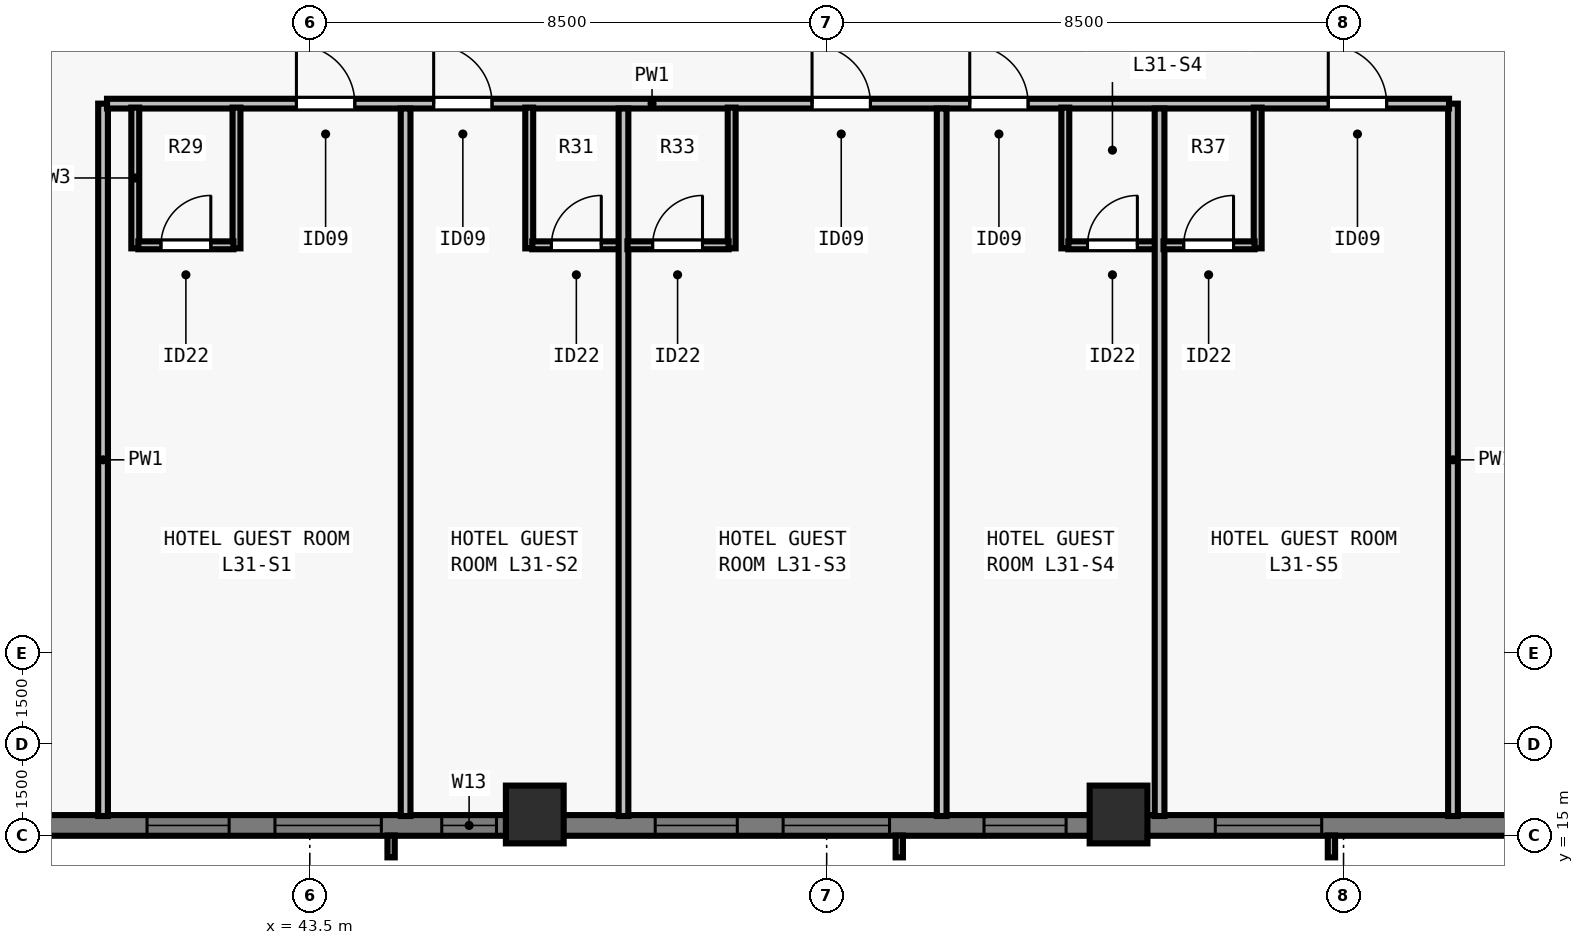
"""IFC4 building model, lengths in metres.
Left out: names, types, materials, properties, quantities, classifications, styles, units other than length and angle.
Written with IfcOpenShell. Run it as: python <this file> out.ifc"""

import sys

from ifc_helpers import new_model, si_unit, direction, frame, frame_2d, origin, origin_2d, place, context, subcontext, project, spatial, rectangle, extrude, element, fill, save


model = new_model("IFC4")
c1 = context("Model", 3, precision=1e-05, world=origin(), true_north=direction((0.0, 1.0)))
c2 = subcontext(c1, "Body", "Model", "MODEL_VIEW")
j1 = project(units=[si_unit("LENGTHUNIT", "METRE"), si_unit("PLANEANGLEUNIT", "RADIAN")], contexts=[c1])
p1 = place(None, origin())
s1 = spatial("IfcSite", under=j1, at=p1, CompositionType="ELEMENT")
p2 = place(p1, origin())
s2 = spatial("IfcBuilding", under=s1, at=p2, CompositionType="ELEMENT")
p3 = place(p2, frame((0.0, 0.0, 116.5)))
s3 = spatial("IfcBuildingStorey", under=s2, at=p3, CompositionType="ELEMENT", Elevation=116.5)
for number, where, z_axis, x_axis in (
    (1, (47.2, 15.35, 0.0), (0.0, 0.0, 1.0), (1.0, 0.0, 0.0)),
    (2, (56.8, 15.35, 0.0), (0.0, 0.0, 1.0), (1.0, 0.0, 0.0)),
):
    element("IfcColumn", number, at=place(p3, frame(where, z_axis=z_axis, x_axis=x_axis)), inside=s3, PredefinedType="COLUMN", context=c2, shape_type="SweptSolid", body=[
        extrude(rectangle(XDim=0.95, YDim=0.95, at=origin_2d()), origin(), (0.0, 0.0, 1.0), 3.5),
    ])
p4 = place(p3, frame((72.0, 15.17, 0.0), z_axis=(0.0, 0.0, 1.0), x_axis=(-1.0, 0.0, 0.0)))
e3 = element("IfcWall", 3, at=p4, inside=s3, PredefinedType="SOLIDWALL", context=c2, shape_type="SweptSolid", body=[
    extrude(rectangle(XDim=39.682, YDim=0.34, at=frame_2d((19.841, 0.0))), origin(), (0.0, 0.0, 1.0), 3.28),
])
p5 = place(p4, frame((11.859, 0.0, 0.8)))
e4 = element("IfcOpeningElement", 4, at=p5, cuts=e3, PredefinedType="OPENING", context=c2, shape_type="SweptSolid", body=[
    extrude(rectangle(XDim=1.75, YDim=1.66, at=frame_2d((0.875, 0.83))), frame((0.0, 0.18, 0.0), z_axis=(0.0, -1.0, 0.0), x_axis=(1.0, 0.0, 0.0)), (0.0, 0.0, 1.0), 0.36),
])
p6 = place(p4, frame((16.062, 0.0, 0.8)))
e5 = element("IfcOpeningElement", 5, at=p6, cuts=e3, PredefinedType="OPENING", context=c2, shape_type="SweptSolid", body=[
    extrude(rectangle(XDim=1.35, YDim=1.66, at=frame_2d((0.675, 0.83))), frame((0.0, 0.18, 0.0), z_axis=(0.0, -1.0, 0.0), x_axis=(1.0, 0.0, 0.0)), (0.0, 0.0, 1.0), 0.36),
])
p7 = place(p4, frame((18.966, 0.0, 0.8)))
e6 = element("IfcOpeningElement", 6, at=p7, cuts=e3, PredefinedType="OPENING", context=c2, shape_type="SweptSolid", body=[
    extrude(rectangle(XDim=1.75, YDim=1.66, at=frame_2d((0.875, 0.83))), frame((0.0, 0.18, 0.0), z_axis=(0.0, -1.0, 0.0), x_axis=(1.0, 0.0, 0.0)), (0.0, 0.0, 1.0), 0.36),
])
p8 = place(p4, frame((21.469, 0.0, 0.8)))
e7 = element("IfcOpeningElement", 7, at=p8, cuts=e3, PredefinedType="OPENING", context=c2, shape_type="SweptSolid", body=[
    extrude(rectangle(XDim=1.35, YDim=1.66, at=frame_2d((0.675, 0.83))), frame((0.0, 0.18, 0.0), z_axis=(0.0, -1.0, 0.0), x_axis=(1.0, 0.0, 0.0)), (0.0, 0.0, 1.0), 0.36),
])
p9 = place(p4, frame((27.323, 0.0, 0.8)))
e8 = element("IfcOpeningElement", 8, at=p9, cuts=e3, PredefinedType="OPENING", context=c2, shape_type="SweptSolid", body=[
    extrude(rectangle(XDim=1.75, YDim=1.66, at=frame_2d((0.875, 0.83))), frame((0.0, 0.18, 0.0), z_axis=(0.0, -1.0, 0.0), x_axis=(1.0, 0.0, 0.0)), (0.0, 0.0, 1.0), 0.36),
])
p10 = place(p4, frame((29.827, 0.0, 0.8)))
e9 = element("IfcOpeningElement", 9, at=p10, cuts=e3, PredefinedType="OPENING", context=c2, shape_type="SweptSolid", body=[
    extrude(rectangle(XDim=1.35, YDim=1.66, at=frame_2d((0.675, 0.83))), frame((0.0, 0.18, 0.0), z_axis=(0.0, -1.0, 0.0), x_axis=(1.0, 0.0, 0.0)), (0.0, 0.0, 1.0), 0.36),
])
p11 = place(p4, frame((25.43, 0.0, 0.8)))
e10 = element("IfcOpeningElement", 10, at=p11, cuts=e3, PredefinedType="OPENING", context=c2, shape_type="SweptSolid", body=[
    extrude(rectangle(XDim=0.9, YDim=1.66, at=frame_2d((0.45, 0.83))), frame((0.0, 0.18, 0.0), z_axis=(0.0, -1.0, 0.0), x_axis=(1.0, 0.0, 0.0)), (0.0, 0.0, 1.0), 0.36),
])
p12 = place(p4, frame((34.39, 0.0, 0.8)))
e11 = element("IfcOpeningElement", 11, at=p12, cuts=e3, PredefinedType="OPENING", context=c2, shape_type="SweptSolid", body=[
    extrude(rectangle(XDim=0.9, YDim=1.66, at=frame_2d((0.45, 0.83))), frame((0.0, 0.18, 0.0), z_axis=(0.0, -1.0, 0.0), x_axis=(1.0, 0.0, 0.0)), (0.0, 0.0, 1.0), 0.36),
])
p13 = place(p3, frame((40.1, 15.325, 0.0), z_axis=(0.0, 0.0, 1.0), x_axis=(0.0, 1.0, 0.0)))
e12 = element("IfcWall", 12, at=p13, inside=s3, PredefinedType="PARTITIONING", context=c2, shape_type="SweptSolid", body=[
    extrude(rectangle(XDim=11.715, YDim=0.16, at=frame_2d((5.857, 0.0))), origin(), (0.0, 0.0, 1.0), 2.555),
])
p14 = place(p3, frame((62.3, 15.325, 0.0), z_axis=(0.0, 0.0, 1.0), x_axis=(0.0, 1.0, 0.0)))
e13 = element("IfcWall", 13, at=p14, inside=s3, PredefinedType="PARTITIONING", context=c2, shape_type="SweptSolid", body=[
    extrude(rectangle(XDim=11.715, YDim=0.16, at=frame_2d((5.857, 0.0))), origin(), (0.0, 0.0, 1.0), 3.28),
])
p15 = place(p3, frame((40.165, 27.04, 0.0), z_axis=(0.0, 0.0, 1.0), x_axis=(1.0, 0.0, 0.0)))
e14 = element("IfcWall", 14, at=p15, inside=s3, PredefinedType="PARTITIONING", context=c2, shape_type="SweptSolid", body=[
    extrude(rectangle(XDim=22.07, YDim=0.16, at=frame_2d((11.035, 0.0))), origin(), (0.0, 0.0, 1.0), 3.28),
])
p16 = place(p15, frame((3.115, 0.0, 0.0)))
e15 = element("IfcOpeningElement", 15, at=p16, cuts=e14, PredefinedType="OPENING", context=c2, shape_type="SweptSolid", body=[
    extrude(rectangle(XDim=0.96, YDim=2.15, at=frame_2d((0.48, 1.075))), frame((0.0, 0.09, 0.0), z_axis=(0.0, -1.0, 0.0), x_axis=(1.0, 0.0, 0.0)), (0.0, 0.0, 1.0), 0.18),
])
p17 = place(p15, frame((5.372, 0.0, 0.0)))
e16 = element("IfcOpeningElement", 16, at=p17, cuts=e14, PredefinedType="OPENING", context=c2, shape_type="SweptSolid", body=[
    extrude(rectangle(XDim=0.96, YDim=2.15, at=frame_2d((0.48, 1.075))), frame((0.0, 0.09, 0.0), z_axis=(0.0, -1.0, 0.0), x_axis=(1.0, 0.0, 0.0)), (0.0, 0.0, 1.0), 0.18),
])
p18 = place(p15, frame((11.594, 0.0, 0.0)))
e17 = element("IfcOpeningElement", 17, at=p18, cuts=e14, PredefinedType="OPENING", context=c2, shape_type="SweptSolid", body=[
    extrude(rectangle(XDim=0.96, YDim=2.15, at=frame_2d((0.48, 1.075))), frame((0.0, 0.09, 0.0), z_axis=(0.0, -1.0, 0.0), x_axis=(1.0, 0.0, 0.0)), (0.0, 0.0, 1.0), 0.18),
])
p19 = place(p15, frame((14.188, 0.0, 0.0)))
e18 = element("IfcOpeningElement", 18, at=p19, cuts=e14, PredefinedType="OPENING", context=c2, shape_type="SweptSolid", body=[
    extrude(rectangle(XDim=0.96, YDim=2.15, at=frame_2d((0.48, 1.075))), frame((0.0, 0.09, 0.0), z_axis=(0.0, -1.0, 0.0), x_axis=(1.0, 0.0, 0.0)), (0.0, 0.0, 1.0), 0.18),
])
p20 = place(p15, frame((20.084, 0.0, 0.0)))
e19 = element("IfcOpeningElement", 19, at=p20, cuts=e14, PredefinedType="OPENING", context=c2, shape_type="SweptSolid", body=[
    extrude(rectangle(XDim=0.96, YDim=2.15, at=frame_2d((0.48, 1.075))), frame((0.0, 0.09, 0.0), z_axis=(0.0, -1.0, 0.0), x_axis=(1.0, 0.0, 0.0)), (0.0, 0.0, 1.0), 0.18),
])
p21 = place(p3, frame((40.63, 24.66, 0.0), z_axis=(0.0, 0.0, 1.0), x_axis=(0.0, 1.0, 0.0)))
e20 = element("IfcWall", 20, at=p21, inside=s3, PredefinedType="PLUMBINGWALL", context=c2, shape_type="SweptSolid", body=[
    extrude(rectangle(XDim=2.315, YDim=0.13, at=frame_2d((1.158, 0.0))), origin(), (0.0, 0.0, 1.0), 2.555),
])
p22 = place(p3, frame((42.294, 24.66, 0.0), z_axis=(0.0, 0.0, 1.0), x_axis=(0.0, 1.0, 0.0)))
e21 = element("IfcWall", 21, at=p22, inside=s3, PredefinedType="PLUMBINGWALL", context=c2, shape_type="SweptSolid", body=[
    extrude(rectangle(XDim=2.315, YDim=0.13, at=frame_2d((1.158, 0.0))), origin(), (0.0, 0.0, 1.0), 3.28),
])
p23 = place(p3, frame((40.68, 24.71, 0.0), z_axis=(0.0, 0.0, 1.0), x_axis=(1.0, 0.0, 0.0)))
e22 = element("IfcWall", 22, at=p23, inside=s3, PredefinedType="PLUMBINGWALL", context=c2, shape_type="SweptSolid", body=[
    extrude(rectangle(XDim=1.564, YDim=0.13, at=frame_2d((0.782, 0.0))), origin(), (0.0, 0.0, 1.0), 3.28),
])
p24 = place(p23, frame((0.372, 0.0, 0.0)))
e23 = element("IfcOpeningElement", 23, at=p24, cuts=e22, PredefinedType="OPENING", context=c2, shape_type="SweptSolid", body=[
    extrude(rectangle(XDim=0.82, YDim=2.1, at=frame_2d((0.41, 1.05))), frame((0.0, 0.075, 0.0), z_axis=(0.0, -1.0, 0.0), x_axis=(1.0, 0.0, 0.0)), (0.0, 0.0, 1.0), 0.15),
])
p25 = place(p3, frame((45.075, 15.325, 0.0), z_axis=(0.0, 0.0, 1.0), x_axis=(0.0, 1.0, 0.0)))
e24 = element("IfcWall", 24, at=p25, inside=s3, PredefinedType="PARTITIONING", context=c2, shape_type="SweptSolid", body=[
    extrude(rectangle(XDim=11.635, YDim=0.16, at=frame_2d((5.817, 0.0))), origin(), (0.0, 0.0, 1.0), 3.28),
])
p26 = place(p3, frame((47.108, 24.66, 0.0), z_axis=(0.0, 0.0, 1.0), x_axis=(0.0, 1.0, 0.0)))
e25 = element("IfcWall", 25, at=p26, inside=s3, PredefinedType="PLUMBINGWALL", context=c2, shape_type="SweptSolid", body=[
    extrude(rectangle(XDim=2.315, YDim=0.13, at=frame_2d((1.158, 0.0))), origin(), (0.0, 0.0, 1.0), 2.555),
])
p27 = place(p3, frame((47.158, 24.71, 0.0), z_axis=(0.0, 0.0, 1.0), x_axis=(1.0, 0.0, 0.0)))
e26 = element("IfcWall", 26, at=p27, inside=s3, PredefinedType="PLUMBINGWALL", context=c2, shape_type="SweptSolid", body=[
    extrude(rectangle(XDim=1.55, YDim=0.13, at=frame_2d((0.775, 0.0))), origin(), (0.0, 0.0, 1.0), 3.28),
])
p28 = place(p27, frame((0.315, 0.0, 0.0)))
e27 = element("IfcOpeningElement", 27, at=p28, cuts=e26, PredefinedType="OPENING", context=c2, shape_type="SweptSolid", body=[
    extrude(rectangle(XDim=0.82, YDim=2.1, at=frame_2d((0.41, 1.05))), frame((0.0, 0.075, 0.0), z_axis=(0.0, -1.0, 0.0), x_axis=(1.0, 0.0, 0.0)), (0.0, 0.0, 1.0), 0.15),
])
p29 = place(p3, frame((48.658, 15.325, 0.0), z_axis=(0.0, 0.0, 1.0), x_axis=(0.0, 1.0, 0.0)))
e28 = element("IfcWall", 28, at=p29, inside=s3, PredefinedType="PARTITIONING", context=c2, shape_type="SweptSolid", body=[
    extrude(rectangle(XDim=11.635, YDim=0.16, at=frame_2d((5.817, 0.0))), origin(), (0.0, 0.0, 1.0), 2.896),
])
p30 = place(p3, frame((50.438, 24.66, 0.0), z_axis=(0.0, 0.0, 1.0), x_axis=(0.0, 1.0, 0.0)))
e29 = element("IfcWall", 29, at=p30, inside=s3, PredefinedType="PLUMBINGWALL", context=c2, shape_type="SweptSolid", body=[
    extrude(rectangle(XDim=2.315, YDim=0.13, at=frame_2d((1.158, 0.0))), origin(), (0.0, 0.0, 1.0), 3.28),
])
p31 = place(p3, frame((48.723, 24.71, 0.0), z_axis=(0.0, 0.0, 1.0), x_axis=(1.0, 0.0, 0.0)))
e30 = element("IfcWall", 30, at=p31, inside=s3, PredefinedType="PLUMBINGWALL", context=c2, shape_type="SweptSolid", body=[
    extrude(rectangle(XDim=1.664, YDim=0.13, at=frame_2d((0.832, 0.0))), origin(), (0.0, 0.0, 1.0), 3.28),
])
p32 = place(p31, frame((0.415, 0.0, 0.0)))
e31 = element("IfcOpeningElement", 31, at=p32, cuts=e30, PredefinedType="OPENING", context=c2, shape_type="SweptSolid", body=[
    extrude(rectangle(XDim=0.82, YDim=2.1, at=frame_2d((0.41, 1.05))), frame((0.0, 0.075, 0.0), z_axis=(0.0, -1.0, 0.0), x_axis=(1.0, 0.0, 0.0)), (0.0, 0.0, 1.0), 0.15),
])
p33 = place(p3, frame((53.892, 15.325, 0.0), z_axis=(0.0, 0.0, 1.0), x_axis=(0.0, 1.0, 0.0)))
e32 = element("IfcWall", 32, at=p33, inside=s3, PredefinedType="PARTITIONING", context=c2, shape_type="SweptSolid", body=[
    extrude(rectangle(XDim=11.635, YDim=0.16, at=frame_2d((5.817, 0.0))), origin(), (0.0, 0.0, 1.0), 2.896),
])
p34 = place(p3, frame((55.925, 24.66, 0.0), z_axis=(0.0, 0.0, 1.0), x_axis=(0.0, 1.0, 0.0)))
e33 = element("IfcWall", 33, at=p34, inside=s3, PredefinedType="PLUMBINGWALL", context=c2, shape_type="SweptSolid", body=[
    extrude(rectangle(XDim=2.315, YDim=0.13, at=frame_2d((1.158, 0.0))), origin(), (0.0, 0.0, 1.0), 3.28),
])
p35 = place(p3, frame((55.975, 24.71, 0.0), z_axis=(0.0, 0.0, 1.0), x_axis=(1.0, 0.0, 0.0)))
e34 = element("IfcWall", 34, at=p35, inside=s3, PredefinedType="PLUMBINGWALL", context=c2, shape_type="SweptSolid", body=[
    extrude(rectangle(XDim=1.55, YDim=0.13, at=frame_2d((0.775, 0.0))), origin(), (0.0, 0.0, 1.0), 3.28),
])
p36 = place(p35, frame((0.315, 0.0, 0.0)))
e35 = element("IfcOpeningElement", 35, at=p36, cuts=e34, PredefinedType="OPENING", context=c2, shape_type="SweptSolid", body=[
    extrude(rectangle(XDim=0.82, YDim=2.1, at=frame_2d((0.41, 1.05))), frame((0.0, 0.075, 0.0), z_axis=(0.0, -1.0, 0.0), x_axis=(1.0, 0.0, 0.0)), (0.0, 0.0, 1.0), 0.15),
])
p37 = place(p3, frame((57.475, 15.325, 0.0), z_axis=(0.0, 0.0, 1.0), x_axis=(0.0, 1.0, 0.0)))
e36 = element("IfcWall", 36, at=p37, inside=s3, PredefinedType="PARTITIONING", context=c2, shape_type="SweptSolid", body=[
    extrude(rectangle(XDim=11.635, YDim=0.16, at=frame_2d((5.817, 0.0))), origin(), (0.0, 0.0, 1.0), 3.28),
])
p38 = place(p3, frame((59.088, 24.66, 0.0), z_axis=(0.0, 0.0, 1.0), x_axis=(0.0, 1.0, 0.0)))
e37 = element("IfcWall", 37, at=p38, inside=s3, PredefinedType="PLUMBINGWALL", context=c2, shape_type="SweptSolid", body=[
    extrude(rectangle(XDim=2.315, YDim=0.13, at=frame_2d((1.158, 0.0))), origin(), (0.0, 0.0, 1.0), 3.28),
])
p39 = place(p3, frame((57.54, 24.71, 0.0), z_axis=(0.0, 0.0, 1.0), x_axis=(1.0, 0.0, 0.0)))
e38 = element("IfcWall", 38, at=p39, inside=s3, PredefinedType="PLUMBINGWALL", context=c2, shape_type="SweptSolid", body=[
    extrude(rectangle(XDim=1.499, YDim=0.13, at=frame_2d((0.749, 0.0))), origin(), (0.0, 0.0, 1.0), 3.28),
])
p40 = place(p39, frame((0.332, 0.0, 0.0)))
e39 = element("IfcOpeningElement", 39, at=p40, cuts=e38, PredefinedType="OPENING", context=c2, shape_type="SweptSolid", body=[
    extrude(rectangle(XDim=0.82, YDim=2.1, at=frame_2d((0.41, 1.05))), frame((0.0, 0.075, 0.0), z_axis=(0.0, -1.0, 0.0), x_axis=(1.0, 0.0, 0.0)), (0.0, 0.0, 1.0), 0.15),
])
p41 = place(p5, origin())
e40 = element("IfcWindow", 40, at=p41, inside=s3, PartitioningType="SINGLE_PANEL", PredefinedType="WINDOW", context=c2, shape_type="SweptSolid", body=[
    extrude(rectangle(XDim=1.75, YDim=1.66, at=frame_2d((0.875, 0.83))), frame((0.0, -0.05, 0.0), z_axis=(0.0, -1.0, 0.0), x_axis=(1.0, 0.0, 0.0)), (0.0, 0.0, 1.0), 0.06),
])
fill(e4, e40)
p42 = place(p6, origin())
e41 = element("IfcWindow", 41, at=p42, inside=s3, PartitioningType="SINGLE_PANEL", PredefinedType="WINDOW", context=c2, shape_type="SweptSolid", body=[
    extrude(rectangle(XDim=1.35, YDim=1.66, at=frame_2d((0.675, 0.83))), frame((0.0, -0.05, 0.0), z_axis=(0.0, -1.0, 0.0), x_axis=(1.0, 0.0, 0.0)), (0.0, 0.0, 1.0), 0.06),
])
fill(e5, e41)
p43 = place(p7, origin())
e42 = element("IfcWindow", 42, at=p43, inside=s3, PartitioningType="SINGLE_PANEL", PredefinedType="WINDOW", context=c2, shape_type="SweptSolid", body=[
    extrude(rectangle(XDim=1.75, YDim=1.66, at=frame_2d((0.875, 0.83))), frame((0.0, -0.05, 0.0), z_axis=(0.0, -1.0, 0.0), x_axis=(1.0, 0.0, 0.0)), (0.0, 0.0, 1.0), 0.06),
])
fill(e6, e42)
p44 = place(p8, origin())
e43 = element("IfcWindow", 43, at=p44, inside=s3, PartitioningType="SINGLE_PANEL", PredefinedType="WINDOW", context=c2, shape_type="SweptSolid", body=[
    extrude(rectangle(XDim=1.35, YDim=1.66, at=frame_2d((0.675, 0.83))), frame((0.0, -0.05, 0.0), z_axis=(0.0, -1.0, 0.0), x_axis=(1.0, 0.0, 0.0)), (0.0, 0.0, 1.0), 0.06),
])
fill(e7, e43)
p45 = place(p9, origin())
e44 = element("IfcWindow", 44, at=p45, inside=s3, PartitioningType="SINGLE_PANEL", PredefinedType="WINDOW", context=c2, shape_type="SweptSolid", body=[
    extrude(rectangle(XDim=1.75, YDim=1.66, at=frame_2d((0.875, 0.83))), frame((0.0, -0.05, 0.0), z_axis=(0.0, -1.0, 0.0), x_axis=(1.0, 0.0, 0.0)), (0.0, 0.0, 1.0), 0.06),
])
fill(e8, e44)
p46 = place(p10, origin())
e45 = element("IfcWindow", 45, at=p46, inside=s3, PartitioningType="SINGLE_PANEL", PredefinedType="WINDOW", context=c2, shape_type="SweptSolid", body=[
    extrude(rectangle(XDim=1.35, YDim=1.66, at=frame_2d((0.675, 0.83))), frame((0.0, -0.05, 0.0), z_axis=(0.0, -1.0, 0.0), x_axis=(1.0, 0.0, 0.0)), (0.0, 0.0, 1.0), 0.06),
])
fill(e9, e45)
p47 = place(p11, origin())
e46 = element("IfcWindow", 46, at=p47, inside=s3, PartitioningType="SINGLE_PANEL", PredefinedType="WINDOW", context=c2, shape_type="SweptSolid", body=[
    extrude(rectangle(XDim=0.9, YDim=1.66, at=frame_2d((0.45, 0.83))), frame((0.0, -0.04, 0.0), z_axis=(0.0, -1.0, 0.0), x_axis=(1.0, 0.0, 0.0)), (0.0, 0.0, 1.0), 0.06),
])
fill(e10, e46)
p48 = place(p24, origin())
e47 = element("IfcDoor", 47, at=p48, inside=s3, OperationType="SINGLE_SWING_RIGHT", PredefinedType="DOOR", context=c2, shape_type="SweptSolid", body=[
    extrude(rectangle(XDim=0.82, YDim=2.1, at=frame_2d((0.41, 1.05))), frame((0.0, 0.025, 0.0), z_axis=(0.0, -1.0, 0.0), x_axis=(1.0, 0.0, 0.0)), (0.0, 0.0, 1.0), 0.05),
])
fill(e23, e47)
p49 = place(p16, origin())
e48 = element("IfcDoor", 48, at=p49, inside=s3, OperationType="SINGLE_SWING_LEFT", PredefinedType="DOOR", context=c2, shape_type="SweptSolid", body=[
    extrude(rectangle(XDim=0.96, YDim=2.15, at=frame_2d((0.48, 1.075))), frame((0.0, 0.025, 0.0), z_axis=(0.0, -1.0, 0.0), x_axis=(1.0, 0.0, 0.0)), (0.0, 0.0, 1.0), 0.05),
])
fill(e15, e48)
p50 = place(p28, origin())
e49 = element("IfcDoor", 49, at=p50, inside=s3, OperationType="SINGLE_SWING_RIGHT", PredefinedType="DOOR", context=c2, shape_type="SweptSolid", body=[
    extrude(rectangle(XDim=0.82, YDim=2.1, at=frame_2d((0.41, 1.05))), frame((0.0, 0.025, 0.0), z_axis=(0.0, -1.0, 0.0), x_axis=(1.0, 0.0, 0.0)), (0.0, 0.0, 1.0), 0.05),
])
fill(e27, e49)
p51 = place(p17, origin())
e50 = element("IfcDoor", 50, at=p51, inside=s3, OperationType="SINGLE_SWING_LEFT", PredefinedType="DOOR", context=c2, shape_type="SweptSolid", body=[
    extrude(rectangle(XDim=0.96, YDim=2.15, at=frame_2d((0.48, 1.075))), frame((0.0, 0.025, 0.0), z_axis=(0.0, -1.0, 0.0), x_axis=(1.0, 0.0, 0.0)), (0.0, 0.0, 1.0), 0.05),
])
fill(e16, e50)
p52 = place(p32, origin())
e51 = element("IfcDoor", 51, at=p52, inside=s3, OperationType="SINGLE_SWING_RIGHT", PredefinedType="DOOR", context=c2, shape_type="SweptSolid", body=[
    extrude(rectangle(XDim=0.82, YDim=2.1, at=frame_2d((0.41, 1.05))), frame((0.0, 0.025, 0.0), z_axis=(0.0, -1.0, 0.0), x_axis=(1.0, 0.0, 0.0)), (0.0, 0.0, 1.0), 0.05),
])
fill(e31, e51)
p53 = place(p18, origin())
e52 = element("IfcDoor", 52, at=p53, inside=s3, OperationType="SINGLE_SWING_LEFT", PredefinedType="DOOR", context=c2, shape_type="SweptSolid", body=[
    extrude(rectangle(XDim=0.96, YDim=2.15, at=frame_2d((0.48, 1.075))), frame((0.0, 0.025, 0.0), z_axis=(0.0, -1.0, 0.0), x_axis=(1.0, 0.0, 0.0)), (0.0, 0.0, 1.0), 0.05),
])
fill(e17, e52)
p54 = place(p36, origin())
e53 = element("IfcDoor", 53, at=p54, inside=s3, OperationType="SINGLE_SWING_RIGHT", PredefinedType="DOOR", context=c2, shape_type="SweptSolid", body=[
    extrude(rectangle(XDim=0.82, YDim=2.1, at=frame_2d((0.41, 1.05))), frame((0.0, 0.025, 0.0), z_axis=(0.0, -1.0, 0.0), x_axis=(1.0, 0.0, 0.0)), (0.0, 0.0, 1.0), 0.05),
])
fill(e35, e53)
p55 = place(p19, origin())
e54 = element("IfcDoor", 54, at=p55, inside=s3, OperationType="SINGLE_SWING_LEFT", PredefinedType="DOOR", context=c2, shape_type="SweptSolid", body=[
    extrude(rectangle(XDim=0.96, YDim=2.15, at=frame_2d((0.48, 1.075))), frame((0.0, 0.025, 0.0), z_axis=(0.0, -1.0, 0.0), x_axis=(1.0, 0.0, 0.0)), (0.0, 0.0, 1.0), 0.05),
])
fill(e18, e54)
p56 = place(p40, origin())
e55 = element("IfcDoor", 55, at=p56, inside=s3, OperationType="SINGLE_SWING_RIGHT", PredefinedType="DOOR", context=c2, shape_type="SweptSolid", body=[
    extrude(rectangle(XDim=0.82, YDim=2.1, at=frame_2d((0.41, 1.05))), frame((0.0, 0.025, 0.0), z_axis=(0.0, -1.0, 0.0), x_axis=(1.0, 0.0, 0.0)), (0.0, 0.0, 1.0), 0.05),
])
fill(e39, e55)
p57 = place(p20, origin())
e56 = element("IfcDoor", 56, at=p57, inside=s3, OperationType="SINGLE_SWING_LEFT", PredefinedType="DOOR", context=c2, shape_type="SweptSolid", body=[
    extrude(rectangle(XDim=0.96, YDim=2.15, at=frame_2d((0.48, 1.075))), frame((0.0, 0.025, 0.0), z_axis=(0.0, -1.0, 0.0), x_axis=(1.0, 0.0, 0.0)), (0.0, 0.0, 1.0), 0.05),
])
fill(e19, e56)
save(model, sys.argv[1])
